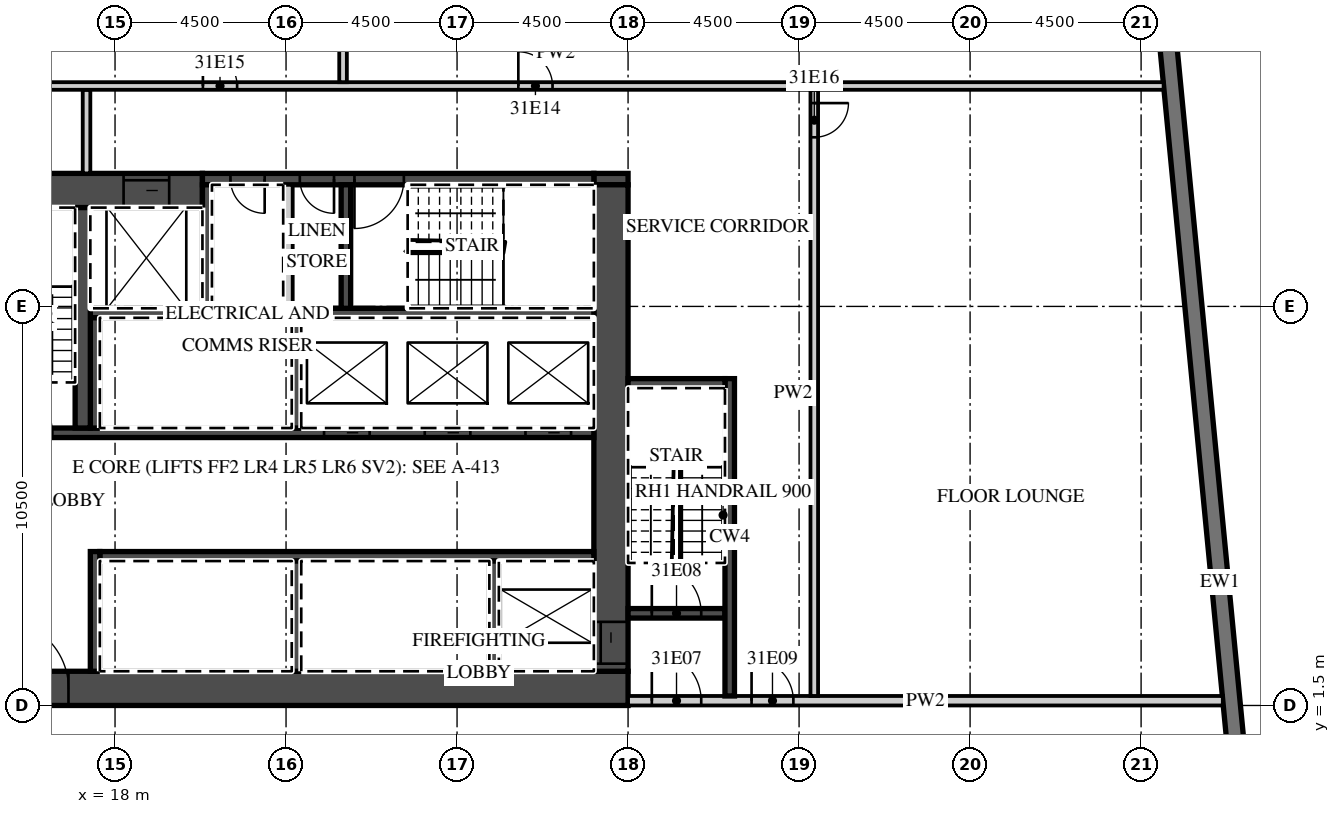
"""IFC4 building model, lengths in metres.
Left out: names, types, materials, properties, quantities, classifications, styles, units other than length and angle.
Written with IfcOpenShell. Run it as: python <this file> out.ifc"""

import sys

from ifc_helpers import new_model, si_unit, direction, frame, frame_2d, origin, place, context, subcontext, project, spatial, rectangle, extrude, element, fill, save


model = new_model("IFC4")
c1 = context("Model", 3, precision=1e-05, world=origin(), true_north=direction((0.0, 1.0)))
c2 = subcontext(c1, "Body", "Model", "MODEL_VIEW")
j1 = project(units=[si_unit("LENGTHUNIT", "METRE"), si_unit("PLANEANGLEUNIT", "RADIAN")], contexts=[c1])
p1 = place(None, origin())
s1 = spatial("IfcSite", under=j1, at=p1, CompositionType="ELEMENT")
p2 = place(p1, origin())
s2 = spatial("IfcBuilding", under=s1, at=p2, CompositionType="ELEMENT")
p3 = place(p2, frame((0.0, 0.0, 137.2)))
s3 = spatial("IfcBuildingStorey", under=s2, at=p3, CompositionType="ELEMENT", Elevation=137.2)
p4 = place(p3, frame((48.753, -12.672, 0.0), z_axis=(0.0, 0.0, 1.0), x_axis=(-0.095842661909, 0.995396495954, 0.0)))
e1 = element("IfcWall", 1, at=p4, inside=s3, PredefinedType="SOLIDWALL", context=c2, shape_type="SweptSolid", body=[
    extrude(rectangle(XDim=35.0, YDim=0.45, at=frame_2d((17.5, 0.0))), origin(), (0.0, 0.0, 1.0), 3.02),
])
p5 = place(p4, frame((3.072, 0.0, 0.45)))
e2 = element("IfcOpeningElement", 2, at=p5, cuts=e1, PredefinedType="OPENING", context=c2, shape_type="SweptSolid", body=[
    extrude(rectangle(XDim=3.3, YDim=2.25, at=frame_2d((1.65, 1.125))), frame((0.0, 0.235, 0.0), z_axis=(0.0, -1.0, 0.0), x_axis=(1.0, 0.0, 0.0)), (0.0, 0.0, 1.0), 0.47),
])
p6 = place(p4, frame((7.593, 0.0, 0.45)))
e3 = element("IfcOpeningElement", 3, at=p6, cuts=e1, PredefinedType="OPENING", context=c2, shape_type="SweptSolid", body=[
    extrude(rectangle(XDim=3.3, YDim=2.25, at=frame_2d((1.65, 1.125))), frame((0.0, 0.235, 0.0), z_axis=(0.0, -1.0, 0.0), x_axis=(1.0, 0.0, 0.0)), (0.0, 0.0, 1.0), 0.47),
])
p7 = place(p3, frame((13.5, 1.95, 0.0), z_axis=(0.0, 0.0, 1.0), x_axis=(1.0, 0.0, 0.0)))
e4 = element("IfcWall", 4, at=p7, inside=s3, PredefinedType="SHEAR", context=c2, shape_type="SweptSolid", body=[
    extrude(rectangle(XDim=18.0, YDim=0.9, at=frame_2d((9.0, 0.0))), origin(), (0.0, 0.0, 1.0), 3.02),
])
p8 = place(p7, frame((1.475, 0.0, 0.0)))
e5 = element("IfcOpeningElement", 5, at=p8, cuts=e4, PredefinedType="OPENING", context=c2, shape_type="SweptSolid", body=[
    extrude(rectangle(XDim=1.8, YDim=2.1, at=frame_2d((0.9, 1.05))), frame((0.0, 0.46, 0.0), z_axis=(0.0, -1.0, 0.0), x_axis=(1.0, 0.0, 0.0)), (0.0, 0.0, 1.0), 0.92),
])
p9 = place(p3, frame((13.5, 15.05, 0.0), z_axis=(0.0, 0.0, 1.0), x_axis=(1.0, 0.0, 0.0)))
e6 = element("IfcWall", 6, at=p9, inside=s3, PredefinedType="SHEAR", context=c2, shape_type="SweptSolid", body=[
    extrude(rectangle(XDim=6.8, YDim=0.9, at=frame_2d((3.4, 0.0))), origin(), (0.0, 0.0, 1.0), 3.02),
])
p10 = place(p9, frame((4.725, 0.0, 0.0)))
e7 = element("IfcOpeningElement", 7, at=p10, cuts=e6, PredefinedType="OPENING", context=c2, shape_type="SweptSolid", body=[
    extrude(rectangle(XDim=1.2, YDim=2.1, at=frame_2d((0.6, 1.05))), frame((0.0, 0.46, 0.0), z_axis=(0.0, -1.0, 0.0), x_axis=(1.0, 0.0, 0.0)), (0.0, 0.0, 1.0), 0.92),
])
p11 = place(p3, frame((30.6, 15.35, 0.0), z_axis=(0.0, 0.0, 1.0), x_axis=(1.0, 0.0, 0.0)))
e8 = element("IfcWall", 8, at=p11, inside=s3, PredefinedType="SHEAR", context=c2, shape_type="SweptSolid", body=[
    extrude(rectangle(XDim=0.9, YDim=0.3, at=frame_2d((0.45, 0.0))), origin(), (0.0, 0.0, 1.0), 3.02),
])
p12 = place(p3, frame((20.3, 15.35, 0.0), z_axis=(0.0, 0.0, 1.0), x_axis=(1.0, 0.0, 0.0)))
e9 = element("IfcWall", 9, at=p12, inside=s3, PredefinedType="SHEAR", context=c2, shape_type="SweptSolid", body=[
    extrude(rectangle(XDim=10.3, YDim=0.3, at=frame_2d((5.15, 0.0))), origin(), (0.0, 0.0, 1.0), 3.02),
])
p13 = place(p12, frame((4.0, 0.0, 0.0)))
e10 = element("IfcOpeningElement", 10, at=p13, cuts=e9, PredefinedType="OPENING", context=c2, shape_type="SweptSolid", body=[
    extrude(rectangle(XDim=1.3, YDim=2.1, at=frame_2d((0.65, 1.05))), frame((0.0, 0.16, 0.0), z_axis=(0.0, -1.0, 0.0), x_axis=(1.0, 0.0, 0.0)), (0.0, 0.0, 1.0), 0.32),
])
p14 = place(p12, frame((2.562, 0.0, 0.0)))
e11 = element("IfcOpeningElement", 11, at=p14, cuts=e9, PredefinedType="OPENING", context=c2, shape_type="SweptSolid", body=[
    extrude(rectangle(XDim=0.9, YDim=2.1, at=frame_2d((0.45, 1.05))), frame((0.0, 0.16, 0.0), z_axis=(0.0, -1.0, 0.0), x_axis=(1.0, 0.0, 0.0)), (0.0, 0.0, 1.0), 0.32),
])
p15 = place(p12, frame((0.738, 0.0, 0.0)))
e12 = element("IfcOpeningElement", 12, at=p15, cuts=e9, PredefinedType="OPENING", context=c2, shape_type="SweptSolid", body=[
    extrude(rectangle(XDim=0.9, YDim=2.1, at=frame_2d((0.45, 1.05))), frame((0.0, 0.16, 0.0), z_axis=(0.0, -1.0, 0.0), x_axis=(1.0, 0.0, 0.0)), (0.0, 0.0, 1.0), 0.32),
])
p16 = place(p3, frame((31.05, 2.4, 0.0), z_axis=(0.0, 0.0, 1.0), x_axis=(0.0, 1.0, 0.0)))
e13 = element("IfcWall", 13, at=p16, inside=s3, PredefinedType="SHEAR", context=c2, shape_type="SweptSolid", body=[
    extrude(rectangle(XDim=12.8, YDim=0.9, at=frame_2d((6.4, 0.0))), origin(), (0.0, 0.0, 1.0), 3.02),
])
p17 = place(p16, frame((0.2, 0.0, 0.0)))
e14 = element("IfcOpeningElement", 14, at=p17, cuts=e13, PredefinedType="OPENING", context=c2, shape_type="SweptSolid", body=[
    extrude(rectangle(XDim=1.1, YDim=2.1, at=frame_2d((0.55, 1.05))), frame((0.0, 0.46, 0.0), z_axis=(0.0, -1.0, 0.0), x_axis=(1.0, 0.0, 0.0)), (0.0, 0.0, 1.0), 0.92),
])
p18 = place(p3, frame((17.6, 5.425, 0.0), z_axis=(0.0, 0.0, 1.0), x_axis=(1.0, 0.0, 0.0)))
e15 = element("IfcWall", 15, at=p18, inside=s3, PredefinedType="SHEAR", context=c2, shape_type="SweptSolid", body=[
    extrude(rectangle(XDim=13.0, YDim=0.25, at=frame_2d((6.5, 0.0))), origin(), (0.0, 0.0, 1.0), 3.02),
])
p19 = place(p3, frame((17.475, 2.4, 0.0), z_axis=(0.0, 0.0, 1.0), x_axis=(0.0, 1.0, 0.0)))
e16 = element("IfcWall", 16, at=p19, inside=s3, PredefinedType="SHEAR", context=c2, shape_type="SweptSolid", body=[
    extrude(rectangle(XDim=3.15, YDim=0.25, at=frame_2d((1.575, 0.0))), origin(), (0.0, 0.0, 1.0), 3.02),
])
for number, where, z_axis, x_axis in (
    (17, (27.975, 2.4, 0.0), (0.0, 0.0, 1.0), (0.0, 1.0, 0.0)),
    (18, (22.775, 2.4, 0.0), (0.0, 0.0, 1.0), (0.0, 1.0, 0.0)),
):
    element("IfcWall", number, at=place(p3, frame(where, z_axis=z_axis, x_axis=x_axis)), inside=s3, PredefinedType="SHEAR", context=c2, shape_type="SweptSolid", body=[
        extrude(rectangle(XDim=2.9, YDim=0.25, at=frame_2d((1.45, 0.0))), origin(), (0.0, 0.0, 1.0), 3.02),
    ])
p20 = place(p3, frame((14.4, 8.675, 0.0), z_axis=(0.0, 0.0, 1.0), x_axis=(1.0, 0.0, 0.0)))
e19 = element("IfcWall", 19, at=p20, inside=s3, PredefinedType="SHEAR", context=c2, shape_type="SweptSolid", body=[
    extrude(rectangle(XDim=16.2, YDim=0.25, at=frame_2d((8.1, 0.0))), origin(), (0.0, 0.0, 1.0), 3.02),
])
p21 = place(p20, frame((14.4, 0.0, 0.0)))
e20 = element("IfcOpeningElement", 20, at=p21, cuts=e19, PredefinedType="OPENING", context=c2, shape_type="SweptSolid", body=[
    extrude(rectangle(XDim=1.2, YDim=2.1, at=frame_2d((0.6, 1.05))), frame((0.0, 0.135, 0.0), z_axis=(0.0, -1.0, 0.0), x_axis=(1.0, 0.0, 0.0)), (0.0, 0.0, 1.0), 0.27),
])
p22 = place(p20, frame((11.75, 0.0, 0.0)))
e21 = element("IfcOpeningElement", 21, at=p22, cuts=e19, PredefinedType="OPENING", context=c2, shape_type="SweptSolid", body=[
    extrude(rectangle(XDim=1.2, YDim=2.1, at=frame_2d((0.6, 1.05))), frame((0.0, 0.135, 0.0), z_axis=(0.0, -1.0, 0.0), x_axis=(1.0, 0.0, 0.0)), (0.0, 0.0, 1.0), 0.27),
])
p23 = place(p20, frame((9.1, 0.0, 0.0)))
e22 = element("IfcOpeningElement", 22, at=p23, cuts=e19, PredefinedType="OPENING", context=c2, shape_type="SweptSolid", body=[
    extrude(rectangle(XDim=1.2, YDim=2.1, at=frame_2d((0.6, 1.05))), frame((0.0, 0.135, 0.0), z_axis=(0.0, -1.0, 0.0), x_axis=(1.0, 0.0, 0.0)), (0.0, 0.0, 1.0), 0.27),
])
p24 = place(p20, frame((0.65, 0.0, 0.0)))
e23 = element("IfcOpeningElement", 23, at=p24, cuts=e19, PredefinedType="OPENING", context=c2, shape_type="SweptSolid", body=[
    extrude(rectangle(XDim=1.3, YDim=2.1, at=frame_2d((0.65, 1.05))), frame((0.0, 0.135, 0.0), z_axis=(0.0, -1.0, 0.0), x_axis=(1.0, 0.0, 0.0)), (0.0, 0.0, 1.0), 0.27),
])
p25 = place(p3, frame((17.35, 11.825, 0.0), z_axis=(0.0, 0.0, 1.0), x_axis=(1.0, 0.0, 0.0)))
e24 = element("IfcWall", 24, at=p25, inside=s3, PredefinedType="SHEAR", context=c2, shape_type="SweptSolid", body=[
    extrude(rectangle(XDim=13.25, YDim=0.25, at=frame_2d((6.625, 0.0))), origin(), (0.0, 0.0, 1.0), 3.02),
])
for number, where, z_axis, x_axis in (
    (25, (17.475, 8.8, 0.0), (0.0, 0.0, 1.0), (0.0, 1.0, 0.0)),
    (26, (22.775, 8.8, 0.0), (0.0, 0.0, 1.0), (0.0, 1.0, 0.0)),
):
    element("IfcWall", number, at=place(p3, frame(where, z_axis=z_axis, x_axis=x_axis)), inside=s3, PredefinedType="SHEAR", context=c2, shape_type="SweptSolid", body=[
        extrude(rectangle(XDim=2.9, YDim=0.25, at=frame_2d((1.45, 0.0))), origin(), (0.0, 0.0, 1.0), 3.02),
    ])
p26 = place(p3, frame((17.15, 8.8, 0.0), z_axis=(0.0, 0.0, 1.0), x_axis=(0.0, 1.0, 0.0)))
e27 = element("IfcWall", 27, at=p26, inside=s3, PredefinedType="SHEAR", context=c2, shape_type="SweptSolid", body=[
    extrude(rectangle(XDim=5.8, YDim=0.4, at=frame_2d((2.9, 0.0))), origin(), (0.0, 0.0, 1.0), 3.02),
])
for number, where, z_axis, x_axis in (
    (28, (20.425, 11.95, 0.0), (0.0, 0.0, 1.0), (0.0, 1.0, 0.0)),
    (29, (24.075, 11.95, 0.0), (0.0, 0.0, 1.0), (0.0, 1.0, 0.0)),
):
    element("IfcWall", number, at=place(p3, frame(where, z_axis=z_axis, x_axis=x_axis)), inside=s3, PredefinedType="SHEAR", context=c2, shape_type="SweptSolid", body=[
        extrude(rectangle(XDim=3.25, YDim=0.25, at=frame_2d((1.625, 0.0))), origin(), (0.0, 0.0, 1.0), 3.02),
    ])
p27 = place(p3, frame((22.55, 11.95, 0.0), z_axis=(0.0, 0.0, 1.0), x_axis=(0.0, 1.0, 0.0)))
e30 = element("IfcWall", 30, at=p27, inside=s3, PredefinedType="PARTITIONING", context=c2, shape_type="SweptSolid", body=[
    extrude(rectangle(XDim=3.25, YDim=0.25, at=frame_2d((1.625, 0.0))), origin(), (0.0, 0.0, 1.0), 3.02),
])
p28 = place(p3, frame((31.5, 1.625, 0.0), z_axis=(0.0, 0.0, 1.0), x_axis=(1.0, 0.0, 0.0)))
e31 = element("IfcWall", 31, at=p28, inside=s3, PredefinedType="PARTITIONING", context=c2, shape_type="SweptSolid", body=[
    extrude(rectangle(XDim=15.65, YDim=0.25, at=frame_2d((7.825, 0.0))), origin(), (0.0, 0.0, 1.0), 3.02),
])
p29 = place(p28, frame((0.625, 0.0, 0.0)))
e32 = element("IfcOpeningElement", 32, at=p29, cuts=e31, PredefinedType="OPENING", context=c2, shape_type="SweptSolid", body=[
    extrude(rectangle(XDim=1.3, YDim=2.1, at=frame_2d((0.65, 1.05))), frame((0.0, 0.135, 0.0), z_axis=(0.0, -1.0, 0.0), x_axis=(1.0, 0.0, 0.0)), (0.0, 0.0, 1.0), 0.27),
])
p30 = place(p28, frame((3.25, 0.0, 0.0)))
e33 = element("IfcOpeningElement", 33, at=p30, cuts=e31, PredefinedType="OPENING", context=c2, shape_type="SweptSolid", body=[
    extrude(rectangle(XDim=1.1, YDim=2.1, at=frame_2d((0.55, 1.05))), frame((0.0, 0.135, 0.0), z_axis=(0.0, -1.0, 0.0), x_axis=(1.0, 0.0, 0.0)), (0.0, 0.0, 1.0), 0.27),
])
p31 = place(p3, frame((31.5, 3.925, 0.0), z_axis=(0.0, 0.0, 1.0), x_axis=(1.0, 0.0, 0.0)))
e34 = element("IfcWall", 34, at=p31, inside=s3, PredefinedType="SHEAR", context=c2, shape_type="SweptSolid", body=[
    extrude(rectangle(XDim=2.55, YDim=0.25, at=frame_2d((1.275, 0.0))), origin(), (0.0, 0.0, 1.0), 3.02),
])
p32 = place(p31, frame((0.625, 0.0, 0.0)))
e35 = element("IfcOpeningElement", 35, at=p32, cuts=e34, PredefinedType="OPENING", context=c2, shape_type="SweptSolid", body=[
    extrude(rectangle(XDim=1.3, YDim=2.1, at=frame_2d((0.65, 1.05))), frame((0.0, 0.135, 0.0), z_axis=(0.0, -1.0, 0.0), x_axis=(1.0, 0.0, 0.0)), (0.0, 0.0, 1.0), 0.27),
])
p33 = place(p3, frame((34.175, 1.75, 0.0), z_axis=(0.0, 0.0, 1.0), x_axis=(0.0, 1.0, 0.0)))
e36 = element("IfcWall", 36, at=p33, inside=s3, PredefinedType="SHEAR", context=c2, shape_type="SweptSolid", body=[
    extrude(rectangle(XDim=8.35, YDim=0.25, at=frame_2d((4.175, 0.0))), origin(), (0.0, 0.0, 1.0), 3.02),
])
p34 = place(p3, frame((31.5, 9.975, 0.0), z_axis=(0.0, 0.0, 1.0), x_axis=(1.0, 0.0, 0.0)))
e37 = element("IfcWall", 37, at=p34, inside=s3, PredefinedType="SHEAR", context=c2, shape_type="SweptSolid", body=[
    extrude(rectangle(XDim=2.55, YDim=0.25, at=frame_2d((1.275, 0.0))), origin(), (0.0, 0.0, 1.0), 3.02),
])
p35 = place(p3, frame((17.25, 15.5, 0.0), z_axis=(0.0, 0.0, 1.0), x_axis=(0.0, 1.0, 0.0)))
e38 = element("IfcWall", 38, at=p35, inside=s3, PredefinedType="PARTITIONING", context=c2, shape_type="SweptSolid", body=[
    extrude(rectangle(XDim=2.2, YDim=0.2, at=frame_2d((1.1, 0.0))), origin(), (0.0, 0.0, 1.0), 3.02),
])
p36 = place(p3, frame((36.4, 1.75, 0.0), z_axis=(0.0, 0.0, 1.0), x_axis=(0.0, 1.0, 0.0)))
e39 = element("IfcWall", 39, at=p36, inside=s3, PredefinedType="PARTITIONING", context=c2, shape_type="SweptSolid", body=[
    extrude(rectangle(XDim=15.95, YDim=0.2, at=frame_2d((7.975, 0.0))), origin(), (0.0, 0.0, 1.0), 3.02),
])
p37 = place(p36, frame((14.7, 0.0, 0.0)))
e40 = element("IfcOpeningElement", 40, at=p37, cuts=e39, PredefinedType="OPENING", context=c2, shape_type="SweptSolid", body=[
    extrude(rectangle(XDim=0.9, YDim=2.1, at=frame_2d((0.45, 1.05))), frame((0.0, 0.11, 0.0), z_axis=(0.0, -1.0, 0.0), x_axis=(1.0, 0.0, 0.0)), (0.0, 0.0, 1.0), 0.22),
])
p38 = place(p3, frame((13.6, 17.8, 0.0), z_axis=(0.0, 0.0, 1.0), x_axis=(1.0, 0.0, 0.0)))
e41 = element("IfcWall", 41, at=p38, inside=s3, PredefinedType="PARTITIONING", context=c2, shape_type="SweptSolid", body=[
    extrude(rectangle(XDim=31.993, YDim=0.2, at=frame_2d((15.997, 0.0))), origin(), (0.0, 0.0, 1.0), 3.02),
])
p39 = place(p38, frame((15.012, 0.0, 0.0)))
e42 = element("IfcOpeningElement", 42, at=p39, cuts=e41, PredefinedType="OPENING", context=c2, shape_type="SweptSolid", body=[
    extrude(rectangle(XDim=0.9, YDim=2.1, at=frame_2d((0.45, 1.05))), frame((0.0, 0.11, 0.0), z_axis=(0.0, -1.0, 0.0), x_axis=(1.0, 0.0, 0.0)), (0.0, 0.0, 1.0), 0.22),
])
p40 = place(p38, frame((6.712, 0.0, 0.0)))
e43 = element("IfcOpeningElement", 43, at=p40, cuts=e41, PredefinedType="OPENING", context=c2, shape_type="SweptSolid", body=[
    extrude(rectangle(XDim=0.9, YDim=2.1, at=frame_2d((0.45, 1.05))), frame((0.0, 0.11, 0.0), z_axis=(0.0, -1.0, 0.0), x_axis=(1.0, 0.0, 0.0)), (0.0, 0.0, 1.0), 0.22),
])
p41 = place(p3, frame((24.0, 17.9, 0.0), z_axis=(0.0, 0.0, 1.0), x_axis=(0.0, 1.0, 0.0)))
e44 = element("IfcWall", 44, at=p41, inside=s3, PredefinedType="PARTITIONING", context=c2, shape_type="SweptSolid", body=[
    extrude(rectangle(XDim=5.774, YDim=0.2, at=frame_2d((2.887, 0.0))), origin(), (0.0, 0.0, 1.0), 3.02),
])
p42 = place(p21, origin())
e45 = element("IfcDoor", 45, at=p42, inside=s3, OperationType="SLIDING_TO_LEFT", PredefinedType="DOOR", context=c2, shape_type="SweptSolid", body=[
    extrude(rectangle(XDim=1.2, YDim=2.1, at=frame_2d((0.6, 1.05))), frame((0.0, 0.025, 0.0), z_axis=(0.0, -1.0, 0.0), x_axis=(1.0, 0.0, 0.0)), (0.0, 0.0, 1.0), 0.05),
])
fill(e20, e45)
p43 = place(p22, origin())
e46 = element("IfcDoor", 46, at=p43, inside=s3, OperationType="SLIDING_TO_RIGHT", PredefinedType="DOOR", context=c2, shape_type="SweptSolid", body=[
    extrude(rectangle(XDim=1.2, YDim=2.1, at=frame_2d((0.6, 1.05))), frame((0.0, 0.025, 0.0), z_axis=(0.0, -1.0, 0.0), x_axis=(1.0, 0.0, 0.0)), (0.0, 0.0, 1.0), 0.05),
])
fill(e21, e46)
p44 = place(p23, origin())
e47 = element("IfcDoor", 47, at=p44, inside=s3, OperationType="SLIDING_TO_RIGHT", PredefinedType="DOOR", context=c2, shape_type="SweptSolid", body=[
    extrude(rectangle(XDim=1.2, YDim=2.1, at=frame_2d((0.6, 1.05))), frame((0.0, 0.025, 0.0), z_axis=(0.0, -1.0, 0.0), x_axis=(1.0, 0.0, 0.0)), (0.0, 0.0, 1.0), 0.05),
])
fill(e22, e47)
p45 = place(p10, origin())
e48 = element("IfcDoor", 48, at=p45, inside=s3, OperationType="SLIDING_TO_LEFT", PredefinedType="DOOR", context=c2, shape_type="SweptSolid", body=[
    extrude(rectangle(XDim=1.2, YDim=2.1, at=frame_2d((0.6, 1.05))), frame((0.0, 0.025, 0.0), z_axis=(0.0, -1.0, 0.0), x_axis=(1.0, 0.0, 0.0)), (0.0, 0.0, 1.0), 0.05),
])
fill(e7, e48)
p46 = place(p17, origin())
e49 = element("IfcDoor", 49, at=p46, inside=s3, OperationType="SLIDING_TO_LEFT", PredefinedType="DOOR", context=c2, shape_type="SweptSolid", body=[
    extrude(rectangle(XDim=1.1, YDim=2.1, at=frame_2d((0.55, 1.05))), frame((0.0, 0.025, 0.0), z_axis=(0.0, -1.0, 0.0), x_axis=(1.0, 0.0, 0.0)), (0.0, 0.0, 1.0), 0.05),
])
fill(e14, e49)
p47 = place(p8, origin())
e50 = element("IfcDoor", 50, at=p47, inside=s3, OperationType="DOUBLE_DOOR_DOUBLE_SWING", PredefinedType="DOOR", context=c2, shape_type="SweptSolid", body=[
    extrude(rectangle(XDim=1.8, YDim=2.1, at=frame_2d((0.9, 1.05))), frame((0.0, 0.025, 0.0), z_axis=(0.0, -1.0, 0.0), x_axis=(1.0, 0.0, 0.0)), (0.0, 0.0, 1.0), 0.05),
])
fill(e5, e50)
p48 = place(p29, origin())
e51 = element("IfcDoor", 51, at=p48, inside=s3, OperationType="SINGLE_SWING_LEFT", PredefinedType="DOOR", context=c2, shape_type="SweptSolid", body=[
    extrude(rectangle(XDim=1.3, YDim=2.1, at=frame_2d((0.65, 1.05))), frame((0.0, 0.025, 0.0), z_axis=(0.0, -1.0, 0.0), x_axis=(1.0, 0.0, 0.0)), (0.0, 0.0, 1.0), 0.05),
])
fill(e32, e51)
p49 = place(p32, origin())
e52 = element("IfcDoor", 52, at=p49, inside=s3, OperationType="SINGLE_SWING_LEFT", PredefinedType="DOOR", context=c2, shape_type="SweptSolid", body=[
    extrude(rectangle(XDim=1.3, YDim=2.1, at=frame_2d((0.65, 1.05))), frame((0.0, 0.025, 0.0), z_axis=(0.0, -1.0, 0.0), x_axis=(1.0, 0.0, 0.0)), (0.0, 0.0, 1.0), 0.05),
])
fill(e35, e52)
p50 = place(p30, origin())
e53 = element("IfcDoor", 53, at=p50, inside=s3, OperationType="SINGLE_SWING_LEFT", PredefinedType="DOOR", context=c2, shape_type="SweptSolid", body=[
    extrude(rectangle(XDim=1.1, YDim=2.1, at=frame_2d((0.55, 1.05))), frame((0.0, 0.025, 0.0), z_axis=(0.0, -1.0, 0.0), x_axis=(1.0, 0.0, 0.0)), (0.0, 0.0, 1.0), 0.05),
])
fill(e33, e53)
p51 = place(p13, origin())
e54 = element("IfcDoor", 54, at=p51, inside=s3, OperationType="SINGLE_SWING_LEFT", PredefinedType="DOOR", context=c2, shape_type="SweptSolid", body=[
    extrude(rectangle(XDim=1.3, YDim=2.1, at=frame_2d((0.65, 1.05))), frame((0.0, 0.025, 0.0), z_axis=(0.0, -1.0, 0.0), x_axis=(1.0, 0.0, 0.0)), (0.0, 0.0, 1.0), 0.05),
])
fill(e10, e54)
p52 = place(p14, origin())
e55 = element("IfcDoor", 55, at=p52, inside=s3, OperationType="SINGLE_SWING_RIGHT", PredefinedType="DOOR", context=c2, shape_type="SweptSolid", body=[
    extrude(rectangle(XDim=0.9, YDim=2.1, at=frame_2d((0.45, 1.05))), frame((0.0, 0.025, 0.0), z_axis=(0.0, -1.0, 0.0), x_axis=(1.0, 0.0, 0.0)), (0.0, 0.0, 1.0), 0.05),
])
fill(e11, e55)
p53 = place(p15, origin())
e56 = element("IfcDoor", 56, at=p53, inside=s3, OperationType="SINGLE_SWING_RIGHT", PredefinedType="DOOR", context=c2, shape_type="SweptSolid", body=[
    extrude(rectangle(XDim=0.9, YDim=2.1, at=frame_2d((0.45, 1.05))), frame((0.0, 0.025, 0.0), z_axis=(0.0, -1.0, 0.0), x_axis=(1.0, 0.0, 0.0)), (0.0, 0.0, 1.0), 0.05),
])
fill(e12, e56)
p54 = place(p39, origin())
e57 = element("IfcDoor", 57, at=p54, inside=s3, OperationType="SINGLE_SWING_LEFT", PredefinedType="DOOR", context=c2, shape_type="SweptSolid", body=[
    extrude(rectangle(XDim=0.9, YDim=2.1, at=frame_2d((0.45, 1.05))), frame((0.0, 0.025, 0.0), z_axis=(0.0, -1.0, 0.0), x_axis=(1.0, 0.0, 0.0)), (0.0, 0.0, 1.0), 0.05),
])
fill(e42, e57)
p55 = place(p40, origin())
e58 = element("IfcDoor", 58, at=p55, inside=s3, OperationType="SINGLE_SWING_LEFT", PredefinedType="DOOR", context=c2, shape_type="SweptSolid", body=[
    extrude(rectangle(XDim=0.9, YDim=2.1, at=frame_2d((0.45, 1.05))), frame((0.0, 0.025, 0.0), z_axis=(0.0, -1.0, 0.0), x_axis=(1.0, 0.0, 0.0)), (0.0, 0.0, 1.0), 0.05),
])
fill(e43, e58)
p56 = place(p37, origin())
e59 = element("IfcDoor", 59, at=p56, inside=s3, OperationType="SINGLE_SWING_RIGHT", PredefinedType="DOOR", context=c2, shape_type="SweptSolid", body=[
    extrude(rectangle(XDim=0.9, YDim=2.1, at=frame_2d((0.45, 1.05))), frame((0.0, 0.025, 0.0), z_axis=(0.0, -1.0, 0.0), x_axis=(1.0, 0.0, 0.0)), (0.0, 0.0, 1.0), 0.05),
])
fill(e40, e59)
save(model, sys.argv[1])
